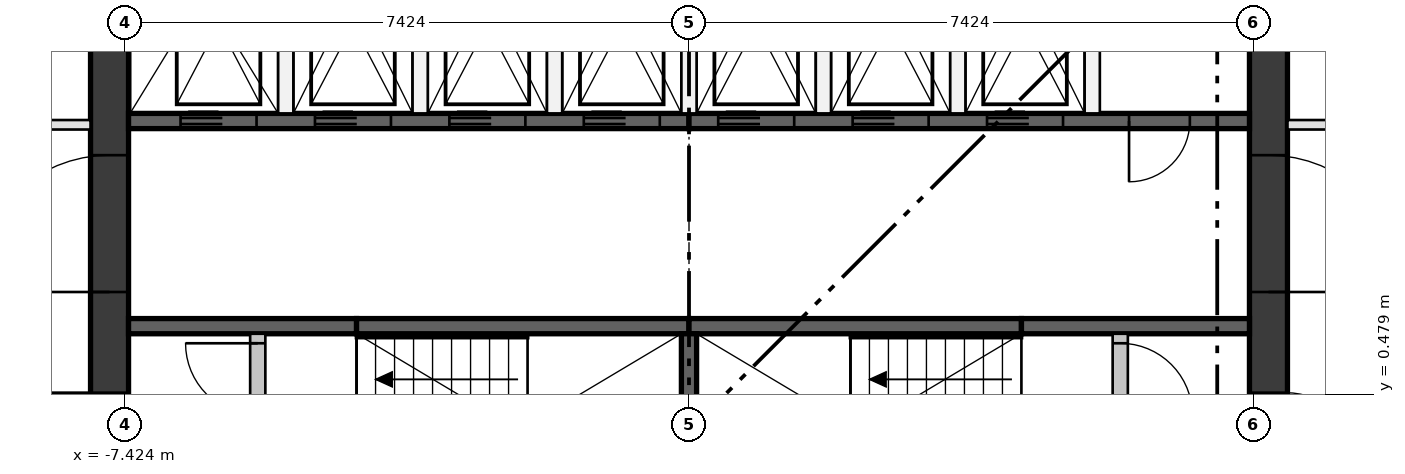
"""IFC4 building model, lengths in metres.
Left out: names, types, materials, properties, quantities, classifications, styles, units other than length and angle.
Written with IfcOpenShell. Run it as: python <this file> out.ifc"""

import sys

from ifc_helpers import new_model, si_unit, direction, frame, frame_2d, origin, place, context, subcontext, project, spatial, rectangle, extrude, element, fill, save


model = new_model("IFC4")
c1 = context("Model", 3, precision=1e-05, world=origin(), true_north=direction((0.0, 1.0)))
c2 = subcontext(c1, "Body", "Model", "MODEL_VIEW")
j1 = project(units=[si_unit("LENGTHUNIT", "METRE"), si_unit("PLANEANGLEUNIT", "RADIAN")], contexts=[c1])
p1 = place(None, origin())
s1 = spatial("IfcSite", under=j1, at=p1, CompositionType="ELEMENT")
p2 = place(p1, origin())
s2 = spatial("IfcBuilding", under=s1, at=p2, CompositionType="ELEMENT")
p3 = place(p2, frame((0.0, 0.0, 191.0)))
s3 = spatial("IfcBuildingStorey", under=s2, at=p3, CompositionType="ELEMENT", Elevation=191.0)
p4 = place(p3, frame((-7.624, -7.374, 0.0), z_axis=(0.0, 0.0, 1.0), x_axis=(0.0, 1.0, 0.0)))
e1 = element("IfcWall", 1, at=p4, inside=s3, PredefinedType="SHEAR", context=c2, shape_type="SweptSolid", body=[
    extrude(rectangle(XDim=14.748, YDim=0.5, at=frame_2d((7.374, 0.0))), origin(), (0.0, 0.0, 1.0), 3.35),
])
p5 = place(p4, frame((6.874, 0.0, 0.0)))
e2 = element("IfcOpeningElement", 2, at=p5, cuts=e1, PredefinedType="OPENING", context=c2, shape_type="SweptSolid", body=[
    extrude(rectangle(XDim=1.0, YDim=2.1, at=frame_2d((0.5, 1.05))), frame((0.0, 0.26, 0.0), z_axis=(0.0, -1.0, 0.0), x_axis=(1.0, 0.0, 0.0)), (0.0, 0.0, 1.0), 0.52),
])
p6 = place(p4, frame((3.75, 0.0, 0.0)))
e3 = element("IfcOpeningElement", 3, at=p6, cuts=e1, PredefinedType="OPENING", context=c2, shape_type="SweptSolid", body=[
    extrude(rectangle(XDim=1.8, YDim=2.1, at=frame_2d((0.9, 1.05))), frame((0.0, 0.26, 0.0), z_axis=(0.0, -1.0, 0.0), x_axis=(1.0, 0.0, 0.0)), (0.0, 0.0, 1.0), 0.52),
])
p7 = place(p4, frame((9.198, 0.0, 0.0)))
e4 = element("IfcOpeningElement", 4, at=p7, cuts=e1, PredefinedType="OPENING", context=c2, shape_type="SweptSolid", body=[
    extrude(rectangle(XDim=1.8, YDim=2.1, at=frame_2d((0.9, 1.05))), frame((0.0, 0.26, 0.0), z_axis=(0.0, -1.0, 0.0), x_axis=(1.0, 0.0, 0.0)), (0.0, 0.0, 1.0), 0.52),
])
p8 = place(p3, frame((7.624, -7.374, 0.0), z_axis=(0.0, 0.0, 1.0), x_axis=(0.0, 1.0, 0.0)))
e5 = element("IfcWall", 5, at=p8, inside=s3, PredefinedType="SHEAR", context=c2, shape_type="SweptSolid", body=[
    extrude(rectangle(XDim=14.748, YDim=0.5, at=frame_2d((7.374, 0.0))), origin(), (0.0, 0.0, 1.0), 3.35),
])
p9 = place(p8, frame((6.874, 0.0, 0.0)))
e6 = element("IfcOpeningElement", 6, at=p9, cuts=e5, PredefinedType="OPENING", context=c2, shape_type="SweptSolid", body=[
    extrude(rectangle(XDim=1.0, YDim=2.1, at=frame_2d((0.5, 1.05))), frame((0.0, 0.26, 0.0), z_axis=(0.0, -1.0, 0.0), x_axis=(1.0, 0.0, 0.0)), (0.0, 0.0, 1.0), 0.52),
])
p10 = place(p8, frame((3.75, 0.0, 0.0)))
e7 = element("IfcOpeningElement", 7, at=p10, cuts=e5, PredefinedType="OPENING", context=c2, shape_type="SweptSolid", body=[
    extrude(rectangle(XDim=1.8, YDim=2.1, at=frame_2d((0.9, 1.05))), frame((0.0, 0.26, 0.0), z_axis=(0.0, -1.0, 0.0), x_axis=(1.0, 0.0, 0.0)), (0.0, 0.0, 1.0), 0.52),
])
p11 = place(p8, frame((9.198, 0.0, 0.0)))
e8 = element("IfcOpeningElement", 8, at=p11, cuts=e5, PredefinedType="OPENING", context=c2, shape_type="SweptSolid", body=[
    extrude(rectangle(XDim=1.8, YDim=2.1, at=frame_2d((0.9, 1.05))), frame((0.0, 0.26, 0.0), z_axis=(0.0, -1.0, 0.0), x_axis=(1.0, 0.0, 0.0)), (0.0, 0.0, 1.0), 0.52),
])
p12 = place(p3, frame((-7.374, 4.074, 0.0), z_axis=(0.0, 0.0, 1.0), x_axis=(1.0, 0.0, 0.0)))
e9 = element("IfcWall", 9, at=p12, inside=s3, PredefinedType="SHEAR", context=c2, shape_type="SweptSolid", body=[
    extrude(rectangle(XDim=7.374, YDim=0.2, at=frame_2d((3.687, 0.0))), origin(), (0.0, 0.0, 1.0), 3.0),
])
p13 = place(p12, frame((0.684, 0.0, 0.0)))
e10 = element("IfcOpeningElement", 10, at=p13, cuts=e9, PredefinedType="OPENING", context=c2, shape_type="SweptSolid", body=[
    extrude(rectangle(XDim=1.0, YDim=2.1, at=frame_2d((0.5, 1.05))), frame((0.0, 0.11, 0.0), z_axis=(0.0, -1.0, 0.0), x_axis=(1.0, 0.0, 0.0)), (0.0, 0.0, 1.0), 0.22),
])
p14 = place(p12, frame((2.453, 0.0, 0.0)))
e11 = element("IfcOpeningElement", 11, at=p14, cuts=e9, PredefinedType="OPENING", context=c2, shape_type="SweptSolid", body=[
    extrude(rectangle(XDim=1.0, YDim=2.1, at=frame_2d((0.5, 1.05))), frame((0.0, 0.11, 0.0), z_axis=(0.0, -1.0, 0.0), x_axis=(1.0, 0.0, 0.0)), (0.0, 0.0, 1.0), 0.22),
])
p15 = place(p12, frame((4.221, 0.0, 0.0)))
e12 = element("IfcOpeningElement", 12, at=p15, cuts=e9, PredefinedType="OPENING", context=c2, shape_type="SweptSolid", body=[
    extrude(rectangle(XDim=1.0, YDim=2.1, at=frame_2d((0.5, 1.05))), frame((0.0, 0.11, 0.0), z_axis=(0.0, -1.0, 0.0), x_axis=(1.0, 0.0, 0.0)), (0.0, 0.0, 1.0), 0.22),
])
p16 = place(p12, frame((5.99, 0.0, 0.0)))
e13 = element("IfcOpeningElement", 13, at=p16, cuts=e9, PredefinedType="OPENING", context=c2, shape_type="SweptSolid", body=[
    extrude(rectangle(XDim=1.0, YDim=2.1, at=frame_2d((0.5, 1.05))), frame((0.0, 0.11, 0.0), z_axis=(0.0, -1.0, 0.0), x_axis=(1.0, 0.0, 0.0)), (0.0, 0.0, 1.0), 0.22),
])
p17 = place(p3, frame((0.0, 4.074, 0.0), z_axis=(0.0, 0.0, 1.0), x_axis=(1.0, 0.0, 0.0)))
e14 = element("IfcWall", 14, at=p17, inside=s3, PredefinedType="SHEAR", context=c2, shape_type="SweptSolid", body=[
    extrude(rectangle(XDim=7.374, YDim=0.2, at=frame_2d((3.687, 0.0))), origin(), (0.0, 0.0, 1.0), 3.0),
])
p18 = place(p17, frame((0.384, 0.0, 0.0)))
e15 = element("IfcOpeningElement", 15, at=p18, cuts=e14, PredefinedType="OPENING", context=c2, shape_type="SweptSolid", body=[
    extrude(rectangle(XDim=1.0, YDim=2.1, at=frame_2d((0.5, 1.05))), frame((0.0, 0.11, 0.0), z_axis=(0.0, -1.0, 0.0), x_axis=(1.0, 0.0, 0.0)), (0.0, 0.0, 1.0), 0.22),
])
p19 = place(p17, frame((2.153, 0.0, 0.0)))
e16 = element("IfcOpeningElement", 16, at=p19, cuts=e14, PredefinedType="OPENING", context=c2, shape_type="SweptSolid", body=[
    extrude(rectangle(XDim=1.0, YDim=2.1, at=frame_2d((0.5, 1.05))), frame((0.0, 0.11, 0.0), z_axis=(0.0, -1.0, 0.0), x_axis=(1.0, 0.0, 0.0)), (0.0, 0.0, 1.0), 0.22),
])
p20 = place(p17, frame((3.921, 0.0, 0.0)))
e17 = element("IfcOpeningElement", 17, at=p20, cuts=e14, PredefinedType="OPENING", context=c2, shape_type="SweptSolid", body=[
    extrude(rectangle(XDim=1.0, YDim=2.1, at=frame_2d((0.5, 1.05))), frame((0.0, 0.11, 0.0), z_axis=(0.0, -1.0, 0.0), x_axis=(1.0, 0.0, 0.0)), (0.0, 0.0, 1.0), 0.22),
])
p21 = place(p17, frame((5.79, 0.0, 0.0)))
e18 = element("IfcOpeningElement", 18, at=p21, cuts=e14, PredefinedType="OPENING", context=c2, shape_type="SweptSolid", body=[
    extrude(rectangle(XDim=0.8, YDim=2.1, at=frame_2d((0.4, 1.05))), frame((0.0, 0.11, 0.0), z_axis=(0.0, -1.0, 0.0), x_axis=(1.0, 0.0, 0.0)), (0.0, 0.0, 1.0), 0.22),
])
p22 = place(p3, frame((-7.374, 1.375, 0.0), z_axis=(0.0, 0.0, 1.0), x_axis=(1.0, 0.0, 0.0)))
e19 = element("IfcWall", 19, at=p22, inside=s3, PredefinedType="SHEAR", context=c2, shape_type="SweptSolid", body=[
    extrude(rectangle(XDim=3.0, YDim=0.2, at=frame_2d((1.5, 0.0))), origin(), (0.0, 0.0, 1.0), 3.0),
])
for number, where, z_axis, x_axis in (
    (20, (-4.374, 1.375, 0.0), (0.0, 0.0, 1.0), (1.0, 0.0, 0.0)),
    (21, (0.0, 1.375, 0.0), (0.0, 0.0, 1.0), (1.0, 0.0, 0.0)),
):
    element("IfcWall", number, at=place(p3, frame(where, z_axis=z_axis, x_axis=x_axis)), inside=s3, PredefinedType="SHEAR", context=c2, shape_type="SweptSolid", body=[
        extrude(rectangle(XDim=4.374, YDim=0.2, at=frame_2d((2.187, 0.0))), origin(), (0.0, 0.0, 1.0), 3.0),
    ])
p23 = place(p3, frame((4.374, 1.375, 0.0), z_axis=(0.0, 0.0, 1.0), x_axis=(1.0, 0.0, 0.0)))
e22 = element("IfcWall", 22, at=p23, inside=s3, PredefinedType="SHEAR", context=c2, shape_type="SweptSolid", body=[
    extrude(rectangle(XDim=3.0, YDim=0.2, at=frame_2d((1.5, 0.0))), origin(), (0.0, 0.0, 1.0), 3.0),
])
p24 = place(p3, frame((0.0, -1.275, 0.0), z_axis=(0.0, 0.0, 1.0), x_axis=(0.0, 1.0, 0.0)))
e23 = element("IfcWall", 23, at=p24, inside=s3, PredefinedType="SHEAR", context=c2, shape_type="SweptSolid", body=[
    extrude(rectangle(XDim=2.55, YDim=0.2, at=frame_2d((1.275, 0.0))), origin(), (0.0, 0.0, 1.0), 3.0),
])
for number, where, z_axis, x_axis in (
    (24, (-5.305, 4.174, 0.0), (0.0, 0.0, 1.0), (0.0, 1.0, 0.0)),
    (25, (-3.537, 4.174, 0.0), (0.0, 0.0, 1.0), (0.0, 1.0, 0.0)),
    (26, (-1.769, 4.174, 0.0), (0.0, 0.0, 1.0), (0.0, 1.0, 0.0)),
    (27, (0.0, 4.174, 0.0), (0.0, 0.0, 1.0), (0.0, 1.0, 0.0)),
    (28, (1.769, 4.174, 0.0), (0.0, 0.0, 1.0), (0.0, 1.0, 0.0)),
    (29, (3.537, 4.174, 0.0), (0.0, 0.0, 1.0), (0.0, 1.0, 0.0)),
    (30, (5.305, 4.174, 0.0), (0.0, 0.0, 1.0), (0.0, 1.0, 0.0)),
):
    element("IfcWall", number, at=place(p3, frame(where, z_axis=z_axis, x_axis=x_axis)), inside=s3, PredefinedType="PARTITIONING", context=c2, shape_type="SweptSolid", body=[
        extrude(rectangle(XDim=3.2, YDim=0.2, at=frame_2d((1.6, 0.0))), origin(), (0.0, 0.0, 1.0), 3.0),
    ])
p25 = place(p3, frame((-5.674, -1.275, 0.0), z_axis=(0.0, 0.0, 1.0), x_axis=(0.0, 1.0, 0.0)))
e31 = element("IfcWall", 31, at=p25, inside=s3, PredefinedType="PARTITIONING", context=c2, shape_type="SweptSolid", body=[
    extrude(rectangle(XDim=2.55, YDim=0.2, at=frame_2d((1.275, 0.0))), origin(), (0.0, 0.0, 1.0), 3.0),
])
p26 = place(p25, frame((0.125, 0.0, 0.0)))
e32 = element("IfcOpeningElement", 32, at=p26, cuts=e31, PredefinedType="OPENING", context=c2, shape_type="SweptSolid", body=[
    extrude(rectangle(XDim=0.95, YDim=2.1, at=frame_2d((0.475, 1.05))), frame((0.0, 0.11, 0.0), z_axis=(0.0, -1.0, 0.0), x_axis=(1.0, 0.0, 0.0)), (0.0, 0.0, 1.0), 0.22),
])
p27 = place(p25, frame((1.475, 0.0, 0.0)))
e33 = element("IfcOpeningElement", 33, at=p27, cuts=e31, PredefinedType="OPENING", context=c2, shape_type="SweptSolid", body=[
    extrude(rectangle(XDim=0.95, YDim=2.1, at=frame_2d((0.475, 1.05))), frame((0.0, 0.11, 0.0), z_axis=(0.0, -1.0, 0.0), x_axis=(1.0, 0.0, 0.0)), (0.0, 0.0, 1.0), 0.22),
])
p28 = place(p3, frame((5.674, -1.275, 0.0), z_axis=(0.0, 0.0, 1.0), x_axis=(0.0, 1.0, 0.0)))
e34 = element("IfcWall", 34, at=p28, inside=s3, PredefinedType="PARTITIONING", context=c2, shape_type="SweptSolid", body=[
    extrude(rectangle(XDim=2.55, YDim=0.2, at=frame_2d((1.275, 0.0))), origin(), (0.0, 0.0, 1.0), 3.0),
])
p29 = place(p28, frame((0.125, 0.0, 0.0)))
e35 = element("IfcOpeningElement", 35, at=p29, cuts=e34, PredefinedType="OPENING", context=c2, shape_type="SweptSolid", body=[
    extrude(rectangle(XDim=0.95, YDim=2.1, at=frame_2d((0.475, 1.05))), frame((0.0, 0.11, 0.0), z_axis=(0.0, -1.0, 0.0), x_axis=(1.0, 0.0, 0.0)), (0.0, 0.0, 1.0), 0.22),
])
p30 = place(p28, frame((1.475, 0.0, 0.0)))
e36 = element("IfcOpeningElement", 36, at=p30, cuts=e34, PredefinedType="OPENING", context=c2, shape_type="SweptSolid", body=[
    extrude(rectangle(XDim=0.95, YDim=2.1, at=frame_2d((0.475, 1.05))), frame((0.0, 0.11, 0.0), z_axis=(0.0, -1.0, 0.0), x_axis=(1.0, 0.0, 0.0)), (0.0, 0.0, 1.0), 0.22),
])
p31 = place(p3, frame((7.874, 4.024, 0.0), z_axis=(0.0, 0.0, 1.0), x_axis=(1.0, 0.0, 0.0)))
e37 = element("IfcWall", 37, at=p31, inside=s3, PredefinedType="PARTITIONING", context=c2, shape_type="SweptSolid", body=[
    extrude(rectangle(XDim=3.95, YDim=0.125, at=frame_2d((1.975, 0.0))), origin(), (0.0, 0.0, 1.0), 3.0),
])
p32 = place(p31, frame((1.3, 0.0, 0.0)))
e38 = element("IfcOpeningElement", 38, at=p32, cuts=e37, PredefinedType="OPENING", context=c2, shape_type="SweptSolid", body=[
    extrude(rectangle(XDim=1.0, YDim=2.1, at=frame_2d((0.5, 1.05))), frame((0.0, 0.073, 0.0), z_axis=(0.0, -1.0, 0.0), x_axis=(1.0, 0.0, 0.0)), (0.0, 0.0, 1.0), 0.145),
])
p33 = place(p3, frame((-11.087, 4.024, 0.0), z_axis=(0.0, 0.0, 1.0), x_axis=(1.0, 0.0, 0.0)))
e39 = element("IfcWall", 39, at=p33, inside=s3, PredefinedType="PARTITIONING", context=c2, shape_type="SweptSolid", body=[
    extrude(rectangle(XDim=3.213, YDim=0.125, at=frame_2d((1.606, 0.0))), origin(), (0.0, 0.0, 1.0), 3.0),
])
p34 = place(p33, frame((1.1, 0.0, 0.0)))
e40 = element("IfcOpeningElement", 40, at=p34, cuts=e39, PredefinedType="OPENING", context=c2, shape_type="SweptSolid", body=[
    extrude(rectangle(XDim=1.0, YDim=2.1, at=frame_2d((0.5, 1.05))), frame((0.0, 0.073, 0.0), z_axis=(0.0, -1.0, 0.0), x_axis=(1.0, 0.0, 0.0)), (0.0, 0.0, 1.0), 0.145),
])
p35 = place(p13, frame((1.0, 0.0, 0.0), z_axis=(0.0, 0.0, 1.0), x_axis=(-1.0, 0.0, 0.0)))
e41 = element("IfcDoor", 41, at=p35, inside=s3, OperationType="DOUBLE_DOOR_SLIDING", PredefinedType="DOOR", context=c2, shape_type="SweptSolid", body=[
    extrude(rectangle(XDim=1.0, YDim=2.1, at=frame_2d((0.5, 1.05))), frame((0.0, 0.025, 0.0), z_axis=(0.0, -1.0, 0.0), x_axis=(1.0, 0.0, 0.0)), (0.0, 0.0, 1.0), 0.05),
])
fill(e10, e41)
p36 = place(p14, frame((1.0, 0.0, 0.0), z_axis=(0.0, 0.0, 1.0), x_axis=(-1.0, 0.0, 0.0)))
e42 = element("IfcDoor", 42, at=p36, inside=s3, OperationType="DOUBLE_DOOR_SLIDING", PredefinedType="DOOR", context=c2, shape_type="SweptSolid", body=[
    extrude(rectangle(XDim=1.0, YDim=2.1, at=frame_2d((0.5, 1.05))), frame((0.0, 0.025, 0.0), z_axis=(0.0, -1.0, 0.0), x_axis=(1.0, 0.0, 0.0)), (0.0, 0.0, 1.0), 0.05),
])
fill(e11, e42)
p37 = place(p15, frame((1.0, 0.0, 0.0), z_axis=(0.0, 0.0, 1.0), x_axis=(-1.0, 0.0, 0.0)))
e43 = element("IfcDoor", 43, at=p37, inside=s3, OperationType="DOUBLE_DOOR_SLIDING", PredefinedType="DOOR", context=c2, shape_type="SweptSolid", body=[
    extrude(rectangle(XDim=1.0, YDim=2.1, at=frame_2d((0.5, 1.05))), frame((0.0, 0.025, 0.0), z_axis=(0.0, -1.0, 0.0), x_axis=(1.0, 0.0, 0.0)), (0.0, 0.0, 1.0), 0.05),
])
fill(e12, e43)
p38 = place(p16, frame((1.0, 0.0, 0.0), z_axis=(0.0, 0.0, 1.0), x_axis=(-1.0, 0.0, 0.0)))
e44 = element("IfcDoor", 44, at=p38, inside=s3, OperationType="DOUBLE_DOOR_SLIDING", PredefinedType="DOOR", context=c2, shape_type="SweptSolid", body=[
    extrude(rectangle(XDim=1.0, YDim=2.1, at=frame_2d((0.5, 1.05))), frame((0.0, 0.025, 0.0), z_axis=(0.0, -1.0, 0.0), x_axis=(1.0, 0.0, 0.0)), (0.0, 0.0, 1.0), 0.05),
])
fill(e13, e44)
p39 = place(p18, frame((1.0, 0.0, 0.0), z_axis=(0.0, 0.0, 1.0), x_axis=(-1.0, 0.0, 0.0)))
e45 = element("IfcDoor", 45, at=p39, inside=s3, OperationType="DOUBLE_DOOR_SLIDING", PredefinedType="DOOR", context=c2, shape_type="SweptSolid", body=[
    extrude(rectangle(XDim=1.0, YDim=2.1, at=frame_2d((0.5, 1.05))), frame((0.0, 0.025, 0.0), z_axis=(0.0, -1.0, 0.0), x_axis=(1.0, 0.0, 0.0)), (0.0, 0.0, 1.0), 0.05),
])
fill(e15, e45)
p40 = place(p19, frame((1.0, 0.0, 0.0), z_axis=(0.0, 0.0, 1.0), x_axis=(-1.0, 0.0, 0.0)))
e46 = element("IfcDoor", 46, at=p40, inside=s3, OperationType="DOUBLE_DOOR_SLIDING", PredefinedType="DOOR", context=c2, shape_type="SweptSolid", body=[
    extrude(rectangle(XDim=1.0, YDim=2.1, at=frame_2d((0.5, 1.05))), frame((0.0, 0.025, 0.0), z_axis=(0.0, -1.0, 0.0), x_axis=(1.0, 0.0, 0.0)), (0.0, 0.0, 1.0), 0.05),
])
fill(e16, e46)
p41 = place(p20, frame((1.0, 0.0, 0.0), z_axis=(0.0, 0.0, 1.0), x_axis=(-1.0, 0.0, 0.0)))
e47 = element("IfcDoor", 47, at=p41, inside=s3, OperationType="DOUBLE_DOOR_SLIDING", PredefinedType="DOOR", context=c2, shape_type="SweptSolid", body=[
    extrude(rectangle(XDim=1.0, YDim=2.1, at=frame_2d((0.5, 1.05))), frame((0.0, 0.025, 0.0), z_axis=(0.0, -1.0, 0.0), x_axis=(1.0, 0.0, 0.0)), (0.0, 0.0, 1.0), 0.05),
])
fill(e17, e47)
p42 = place(p27, origin())
e48 = element("IfcDoor", 48, at=p42, inside=s3, OperationType="SINGLE_SWING_RIGHT", PredefinedType="DOOR", context=c2, shape_type="SweptSolid", body=[
    extrude(rectangle(XDim=0.95, YDim=2.1, at=frame_2d((0.475, 1.05))), frame((0.0, 0.025, 0.0), z_axis=(0.0, -1.0, 0.0), x_axis=(1.0, 0.0, 0.0)), (0.0, 0.0, 1.0), 0.05),
])
fill(e33, e48)
p43 = place(p30, frame((0.95, 0.0, 0.0), z_axis=(0.0, 0.0, 1.0), x_axis=(-1.0, 0.0, 0.0)))
e49 = element("IfcDoor", 49, at=p43, inside=s3, OperationType="SINGLE_SWING_LEFT", PredefinedType="DOOR", context=c2, shape_type="SweptSolid", body=[
    extrude(rectangle(XDim=0.95, YDim=2.1, at=frame_2d((0.475, 1.05))), frame((0.0, 0.025, 0.0), z_axis=(0.0, -1.0, 0.0), x_axis=(1.0, 0.0, 0.0)), (0.0, 0.0, 1.0), 0.05),
])
fill(e36, e49)
p44 = place(p21, frame((0.8, 0.0, 0.0), z_axis=(0.0, 0.0, 1.0), x_axis=(-1.0, 0.0, 0.0)))
e50 = element("IfcDoor", 50, at=p44, inside=s3, OperationType="SINGLE_SWING_LEFT", PredefinedType="DOOR", context=c2, shape_type="SweptSolid", body=[
    extrude(rectangle(XDim=0.8, YDim=2.1, at=frame_2d((0.4, 1.05))), frame((0.0, 0.025, 0.0), z_axis=(0.0, -1.0, 0.0), x_axis=(1.0, 0.0, 0.0)), (0.0, 0.0, 1.0), 0.05),
])
fill(e18, e50)
p45 = place(p5, origin())
e51 = element("IfcDoor", 51, at=p45, inside=s3, OperationType="SINGLE_SWING_RIGHT", PredefinedType="DOOR", context=c2, shape_type="SweptSolid", body=[
    extrude(rectangle(XDim=1.0, YDim=2.1, at=frame_2d((0.5, 1.05))), frame((0.0, 0.25, 0.0), z_axis=(0.0, -1.0, 0.0), x_axis=(1.0, 0.0, 0.0)), (0.0, 0.0, 1.0), 0.05),
])
fill(e2, e51)
p46 = place(p7, origin())
e52 = element("IfcDoor", 52, at=p46, inside=s3, OperationType="DOUBLE_DOOR_SINGLE_SWING", PredefinedType="DOOR", context=c2, shape_type="SweptSolid", body=[
    extrude(rectangle(XDim=1.8, YDim=2.1, at=frame_2d((0.9, 1.05))), frame((0.0, 0.025, 0.0), z_axis=(0.0, -1.0, 0.0), x_axis=(1.0, 0.0, 0.0)), (0.0, 0.0, 1.0), 0.05),
])
fill(e4, e52)
p47 = place(p9, frame((1.0, 0.0, 0.0), z_axis=(0.0, 0.0, 1.0), x_axis=(-1.0, 0.0, 0.0)))
e53 = element("IfcDoor", 53, at=p47, inside=s3, OperationType="SINGLE_SWING_LEFT", PredefinedType="DOOR", context=c2, shape_type="SweptSolid", body=[
    extrude(rectangle(XDim=1.0, YDim=2.1, at=frame_2d((0.5, 1.05))), frame((0.0, 0.25, 0.0), z_axis=(0.0, -1.0, 0.0), x_axis=(1.0, 0.0, 0.0)), (0.0, 0.0, 1.0), 0.05),
])
fill(e6, e53)
p48 = place(p11, frame((1.8, 0.0, 0.0), z_axis=(0.0, 0.0, 1.0), x_axis=(-1.0, 0.0, 0.0)))
e54 = element("IfcDoor", 54, at=p48, inside=s3, OperationType="DOUBLE_DOOR_SINGLE_SWING", PredefinedType="DOOR", context=c2, shape_type="SweptSolid", body=[
    extrude(rectangle(XDim=1.8, YDim=2.1, at=frame_2d((0.9, 1.05))), frame((0.0, 0.025, 0.0), z_axis=(0.0, -1.0, 0.0), x_axis=(1.0, 0.0, 0.0)), (0.0, 0.0, 1.0), 0.05),
])
fill(e8, e54)
save(model, sys.argv[1])
